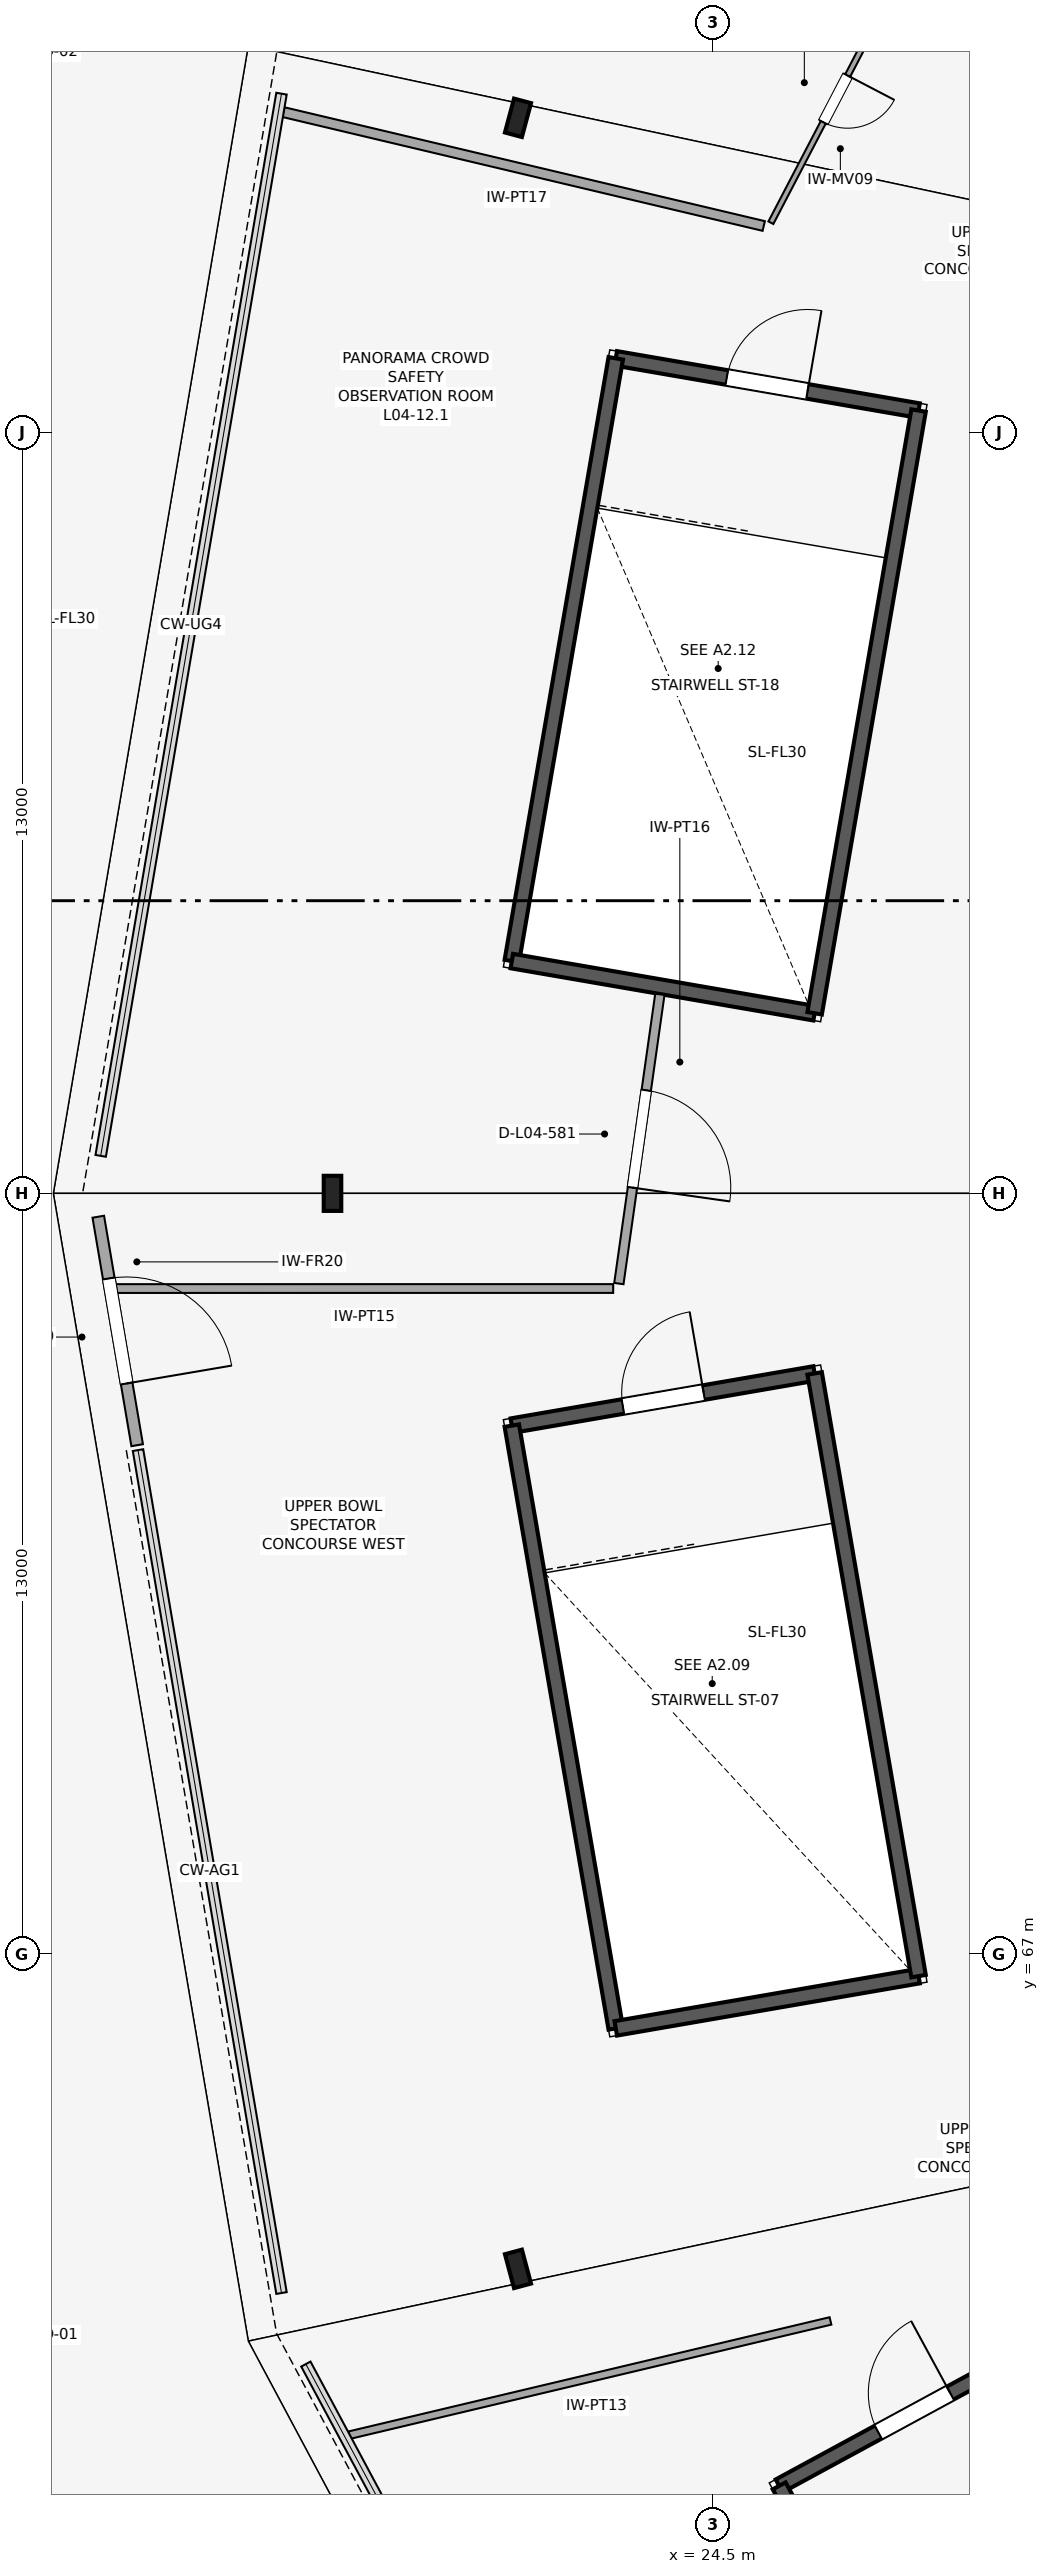
"""IFC4 building model, lengths in metres.
Left out: names, types, materials, properties, quantities, classifications, styles, units other than length and angle.
Written with IfcOpenShell. Run it as: python <this file> out.ifc"""

import sys

from ifc_helpers import new_model, si_unit, direction, frame, frame_2d, origin, origin_2d, place, context, subcontext, project, spatial, rectangle, i_section, extrude, element, fill, save


model = new_model("IFC4")
c1 = context("Model", 3, precision=1e-05, world=origin(), true_north=direction((0.0, 1.0)))
c2 = subcontext(c1, "Body", "Model", "MODEL_VIEW")
j1 = project(units=[si_unit("LENGTHUNIT", "METRE"), si_unit("PLANEANGLEUNIT", "RADIAN")], contexts=[c1])
p1 = place(None, origin())
s1 = spatial("IfcSite", under=j1, at=p1, CompositionType="ELEMENT")
p2 = place(p1, origin())
s2 = spatial("IfcBuilding", under=s1, at=p2, CompositionType="ELEMENT")
p3 = place(p2, frame((0.0, 0.0, 20.8)))
s3 = spatial("IfcBuildingStorey", under=s2, at=p3, CompositionType="ELEMENT", Elevation=20.8)
for number, where, z_axis, x_axis in (
    (1, (21.169, 98.376, 0.0), (0.0, 0.0, 1.0), (-0.966, 0.259, 0.0)),
    (2, (18.0, 80.0, 0.0), (0.0, 0.0, 1.0), (-1.0, 0.0, 0.0)),
    (3, (21.169, 61.624, 0.0), (0.0, 0.0, 1.0), (-0.966, -0.259, 0.0)),
):
    element("IfcColumn", number, at=place(p3, frame(where, z_axis=z_axis, x_axis=x_axis)), inside=s3, PredefinedType="COLUMN", context=c2, shape_type="SweptSolid", body=[
        extrude(i_section(OverallWidth=0.3, OverallDepth=0.6, WebThickness=0.015, FlangeThickness=0.03, FilletRadius=0.027, at=origin_2d()), origin(), (0.0, 0.0, 1.0), 5.4),
    ])
p4 = place(p3, frame((25.632, 102.083, 0.0), z_axis=(0.0, 0.0, 1.0), x_axis=(0.878961487093, -0.47689275965, 0.0)))
e4 = element("IfcWall", 4, at=p4, inside=s3, PredefinedType="SHEAR", context=c2, shape_type="SweptSolid", body=[
    extrude(rectangle(XDim=5.25, YDim=0.25, at=frame_2d((2.625, 0.0))), origin(), (0.0, 0.0, 1.0), 5.14),
])
p5 = place(p3, frame((26.238, 76.923, 0.0), z_axis=(0.0, 0.0, 1.0), x_axis=(-0.985457162135, -0.16992404655, 0.0)))
e5 = element("IfcWall", 5, at=p5, inside=s3, PredefinedType="SHEAR", context=c2, shape_type="SweptSolid", body=[
    extrude(rectangle(XDim=5.25, YDim=0.25, at=frame_2d((2.625, 0.0))), origin(), (0.0, 0.0, 1.0), 3.2),
])
p6 = place(p5, frame((1.925, 0.0, 0.0)))
e6 = element("IfcOpeningElement", 6, at=p6, cuts=e5, PredefinedType="OPENING", context=c2, shape_type="SweptSolid", body=[
    extrude(rectangle(XDim=1.4, YDim=2.2, at=frame_2d((0.7, 1.1))), frame((0.0, 0.135, 0.0), z_axis=(0.0, -1.0, 0.0), x_axis=(1.0, 0.0, 0.0)), (0.0, 0.0, 1.0), 0.27),
])
p7 = place(p3, frame((21.064, 76.031, 0.0), z_axis=(0.0, 0.0, 1.0), x_axis=(0.169938992676, -0.985454584833, 0.0)))
e7 = element("IfcWall", 7, at=p7, inside=s3, PredefinedType="SHEAR", context=c2, shape_type="SweptSolid", body=[
    extrude(rectangle(XDim=10.45, YDim=0.25, at=frame_2d((5.225, 0.0))), origin(), (0.0, 0.0, 1.0), 3.2),
])
p8 = place(p3, frame((22.84, 65.733, 0.0), z_axis=(0.0, 0.0, 1.0), x_axis=(0.985457162135, 0.16992404655, 0.0)))
e8 = element("IfcWall", 8, at=p8, inside=s3, PredefinedType="SHEAR", context=c2, shape_type="SweptSolid", body=[
    extrude(rectangle(XDim=5.25, YDim=0.25, at=frame_2d((2.625, 0.0))), origin(), (0.0, 0.0, 1.0), 3.2),
])
p9 = place(p3, frame((28.013, 66.625, 0.0), z_axis=(0.0, 0.0, 1.0), x_axis=(-0.169938992676, 0.985454584833, 0.0)))
e9 = element("IfcWall", 9, at=p9, inside=s3, PredefinedType="SHEAR", context=c2, shape_type="SweptSolid", body=[
    extrude(rectangle(XDim=10.45, YDim=0.25, at=frame_2d((5.225, 0.0))), origin(), (0.0, 0.0, 1.0), 3.2),
])
p10 = place(p3, frame((30.246, 60.42, 0.0), z_axis=(0.0, 0.0, 1.0), x_axis=(-0.878961487093, -0.47689275965, 0.0)))
e10 = element("IfcWall", 10, at=p10, inside=s3, PredefinedType="SHEAR", context=c2, shape_type="SweptSolid", body=[
    extrude(rectangle(XDim=5.25, YDim=0.25, at=frame_2d((2.625, 0.0))), origin(), (0.0, 0.0, 1.0), 3.2),
])
p11 = place(p10, frame((1.925, 0.0, 0.0)))
e11 = element("IfcOpeningElement", 11, at=p11, cuts=e10, PredefinedType="OPENING", context=c2, shape_type="SweptSolid", body=[
    extrude(rectangle(XDim=1.4, YDim=2.2, at=frame_2d((0.7, 1.1))), frame((0.0, 0.135, 0.0), z_axis=(0.0, -1.0, 0.0), x_axis=(1.0, 0.0, 0.0)), (0.0, 0.0, 1.0), 0.27),
])
p12 = place(p3, frame((25.632, 57.917, 0.0), z_axis=(0.0, 0.0, 1.0), x_axis=(0.476876856974, -0.878970115125, 0.0)))
e12 = element("IfcWall", 12, at=p12, inside=s3, PredefinedType="SHEAR", context=c2, shape_type="SweptSolid", body=[
    extrude(rectangle(XDim=10.45, YDim=0.25, at=frame_2d((5.225, 0.0))), origin(), (0.0, 0.0, 1.0), 3.2),
])
p13 = place(p3, frame((28.013, 93.375, 0.0), z_axis=(0.0, 0.0, 1.0), x_axis=(-0.985457162135, 0.16992404655, 0.0)))
e13 = element("IfcWall", 13, at=p13, inside=s3, PredefinedType="SHEAR", context=c2, shape_type="SweptSolid", body=[
    extrude(rectangle(XDim=5.25, YDim=0.25, at=frame_2d((2.625, 0.0))), origin(), (0.0, 0.0, 1.0), 3.2),
])
p14 = place(p13, frame((1.925, 0.0, 0.0)))
e14 = element("IfcOpeningElement", 14, at=p14, cuts=e13, PredefinedType="OPENING", context=c2, shape_type="SweptSolid", body=[
    extrude(rectangle(XDim=1.4, YDim=2.2, at=frame_2d((0.7, 1.1))), frame((0.0, 0.135, 0.0), z_axis=(0.0, -1.0, 0.0), x_axis=(1.0, 0.0, 0.0)), (0.0, 0.0, 1.0), 0.27),
])
p15 = place(p3, frame((22.84, 94.267, 0.0), z_axis=(0.0, 0.0, 1.0), x_axis=(-0.169938992676, -0.985454584833, 0.0)))
e15 = element("IfcWall", 15, at=p15, inside=s3, PredefinedType="SHEAR", context=c2, shape_type="SweptSolid", body=[
    extrude(rectangle(XDim=10.45, YDim=0.25, at=frame_2d((5.225, 0.0))), origin(), (0.0, 0.0, 1.0), 3.2),
])
p16 = place(p3, frame((21.064, 83.969, 0.0), z_axis=(0.0, 0.0, 1.0), x_axis=(0.985458504796, -0.169916259745, 0.0)))
e16 = element("IfcWall", 16, at=p16, inside=s3, PredefinedType="SHEAR", context=c2, shape_type="SweptSolid", body=[
    extrude(rectangle(XDim=5.25, YDim=0.25, at=frame_2d((2.625, 0.0))), origin(), (0.0, 0.0, 1.0), 3.2),
])
p17 = place(p3, frame((26.238, 83.077, 0.0), z_axis=(0.0, 0.0, 1.0), x_axis=(0.16991630471, 0.985458497043, 0.0)))
e17 = element("IfcWall", 17, at=p17, inside=s3, PredefinedType="SHEAR", context=c2, shape_type="SweptSolid", body=[
    extrude(rectangle(XDim=10.45, YDim=0.25, at=frame_2d((5.225, 0.0))), origin(), (0.0, 0.0, 1.0), 3.2),
])
p18 = place(p3, frame((27.697, 100.815, 0.0), z_axis=(0.0, 0.0, 1.0), x_axis=(-0.462454112577, -0.886643216723, 0.0)))
e18 = element("IfcWall", 18, at=p18, inside=s3, PredefinedType="MOVABLE", context=c2, shape_type="SweptSolid", body=[
    extrude(rectangle(XDim=4.772, YDim=0.095, at=frame_2d((2.386, 0.0))), origin(), (0.0, 0.0, 1.0), 3.89),
])
p19 = place(p18, frame((1.936, 0.0, 0.0)))
e19 = element("IfcOpeningElement", 19, at=p19, cuts=e18, PredefinedType="OPENING", context=c2, shape_type="SweptSolid", body=[
    extrude(rectangle(XDim=0.9, YDim=2.1, at=frame_2d((0.45, 1.05))), frame((0.0, 0.057, 0.0), z_axis=(0.0, -1.0, 0.0), x_axis=(1.0, 0.0, 0.0)), (0.0, 0.0, 1.0), 0.115),
])
p20 = place(p3, frame((25.368, 96.528, 0.0), z_axis=(0.0, 0.0, 1.0), x_axis=(-0.973029696707, 0.23067988496, 0.0)))
e20 = element("IfcWall", 20, at=p20, inside=s3, PredefinedType="PARTITIONING", context=c2, shape_type="SweptSolid", body=[
    extrude(rectangle(XDim=8.434, YDim=0.17, at=frame_2d((4.217, 0.0))), origin(), (0.0, 0.0, 1.0), 3.89),
])
p21 = place(p3, frame((23.593, 83.401, 0.0), z_axis=(0.0, 0.0, 1.0), x_axis=(-0.140366813121, -0.990099569626, 0.0)))
e21 = element("IfcWall", 21, at=p21, inside=s3, PredefinedType="PARTITIONING", context=c2, shape_type="SweptSolid", body=[
    extrude(rectangle(XDim=4.992, YDim=0.16, at=frame_2d((2.496, 0.0))), origin(), (0.0, 0.0, 1.0), 3.89),
])
p22 = place(p21, frame((1.656, 0.0, 0.0)))
e22 = element("IfcOpeningElement", 22, at=p22, cuts=e21, PredefinedType="OPENING", context=c2, shape_type="SweptSolid", body=[
    extrude(rectangle(XDim=1.68, YDim=2.1, at=frame_2d((0.84, 1.05))), frame((0.0, 0.09, 0.0), z_axis=(0.0, -1.0, 0.0), x_axis=(1.0, 0.0, 0.0)), (0.0, 0.0, 1.0), 0.18),
])
p23 = place(p3, frame((22.796, 78.374, 0.0), z_axis=(0.0, 0.0, 1.0), x_axis=(-0.999999996291, -8.6130171e-05, 0.0)))
e23 = element("IfcWall", 23, at=p23, inside=s3, PredefinedType="PARTITIONING", context=c2, shape_type="SweptSolid", body=[
    extrude(rectangle(XDim=8.504, YDim=0.15, at=frame_2d((4.252, 0.0))), origin(), (0.0, 0.0, 1.0), 3.89),
])
p24 = place(p3, frame((26.508, 60.735, 0.0), z_axis=(0.0, 0.0, 1.0), x_axis=(-0.972955470333, -0.230992754756, 0.0)))
e24 = element("IfcWall", 24, at=p24, inside=s3, PredefinedType="PARTITIONING", context=c2, shape_type="SweptSolid", body=[
    extrude(rectangle(XDim=8.448, YDim=0.13, at=frame_2d((4.224, 0.0))), origin(), (0.0, 0.0, 1.0), 3.89),
])
p25 = place(p3, frame((13.998, 79.601, 0.0), z_axis=(0.0, 0.0, 1.0), x_axis=(0.167827395589, -0.985816395324, 0.0)))
e25 = element("IfcWall", 25, at=p25, inside=s3, PredefinedType="PARTITIONING", context=c2, shape_type="SweptSolid", body=[
    extrude(rectangle(XDim=3.96, YDim=0.2, at=frame_2d((1.98, 0.0))), origin(), (0.0, 0.0, 1.0), 3.89),
])
p26 = place(p25, frame((1.07, 0.0, 0.0)))
e26 = element("IfcOpeningElement", 26, at=p26, cuts=e25, PredefinedType="OPENING", context=c2, shape_type="SweptSolid", body=[
    extrude(rectangle(XDim=1.82, YDim=2.38, at=frame_2d((0.91, 1.19))), frame((0.0, 0.11, 0.0), z_axis=(0.0, -1.0, 0.0), x_axis=(1.0, 0.0, 0.0)), (0.0, 0.0, 1.0), 0.22),
])
p27 = place(p6, frame((1.4, 0.0, 0.0), z_axis=(0.0, 0.0, 1.0), x_axis=(-1.0, 0.0, 0.0)))
e27 = element("IfcDoor", 27, at=p27, inside=s3, OperationType="SINGLE_SWING_RIGHT", PredefinedType="DOOR", context=c2, shape_type="SweptSolid", body=[
    extrude(rectangle(XDim=1.4, YDim=2.2, at=frame_2d((0.7, 1.1))), frame((0.0, 0.025, 0.0), z_axis=(0.0, -1.0, 0.0), x_axis=(1.0, 0.0, 0.0)), (0.0, 0.0, 1.0), 0.05),
])
fill(e6, e27)
p28 = place(p11, frame((1.4, 0.0, 0.0), z_axis=(0.0, 0.0, 1.0), x_axis=(-1.0, 0.0, 0.0)))
e28 = element("IfcDoor", 28, at=p28, inside=s3, OperationType="SINGLE_SWING_RIGHT", PredefinedType="DOOR", context=c2, shape_type="SweptSolid", body=[
    extrude(rectangle(XDim=1.4, YDim=2.2, at=frame_2d((0.7, 1.1))), frame((0.0, 0.025, 0.0), z_axis=(0.0, -1.0, 0.0), x_axis=(1.0, 0.0, 0.0)), (0.0, 0.0, 1.0), 0.05),
])
fill(e11, e28)
p29 = place(p14, frame((1.4, 0.0, 0.0), z_axis=(0.0, 0.0, 1.0), x_axis=(-1.0, 0.0, 0.0)))
e29 = element("IfcDoor", 29, at=p29, inside=s3, OperationType="SINGLE_SWING_RIGHT", PredefinedType="DOOR", context=c2, shape_type="SweptSolid", body=[
    extrude(rectangle(XDim=1.4, YDim=2.2, at=frame_2d((0.7, 1.1))), frame((0.0, 0.025, 0.0), z_axis=(0.0, -1.0, 0.0), x_axis=(1.0, 0.0, 0.0)), (0.0, 0.0, 1.0), 0.05),
])
fill(e14, e29)
p30 = place(p19, origin())
e30 = element("IfcDoor", 30, at=p30, inside=s3, OperationType="SINGLE_SWING_LEFT", PredefinedType="DOOR", context=c2, shape_type="SweptSolid", body=[
    extrude(rectangle(XDim=0.9, YDim=2.1, at=frame_2d((0.45, 1.05))), frame((0.0, 0.025, 0.0), z_axis=(0.0, -1.0, 0.0), x_axis=(1.0, 0.0, 0.0)), (0.0, 0.0, 1.0), 0.05),
])
fill(e19, e30)
p31 = place(p22, origin())
e31 = element("IfcDoor", 31, at=p31, inside=s3, OperationType="SINGLE_SWING_RIGHT", PredefinedType="DOOR", context=c2, shape_type="SweptSolid", body=[
    extrude(rectangle(XDim=1.68, YDim=2.1, at=frame_2d((0.84, 1.05))), frame((0.0, 0.025, 0.0), z_axis=(0.0, -1.0, 0.0), x_axis=(1.0, 0.0, 0.0)), (0.0, 0.0, 1.0), 0.05),
])
fill(e22, e31)
p32 = place(p26, origin())
e32 = element("IfcDoor", 32, at=p32, inside=s3, OperationType="SINGLE_SWING_RIGHT", PredefinedType="DOOR", context=c2, shape_type="SweptSolid", body=[
    extrude(rectangle(XDim=1.82, YDim=2.38, at=frame_2d((0.91, 1.19))), frame((0.0, 0.025, 0.0), z_axis=(0.0, -1.0, 0.0), x_axis=(1.0, 0.0, 0.0)), (0.0, 0.0, 1.0), 0.05),
])
fill(e26, e32)
save(model, sys.argv[1])
